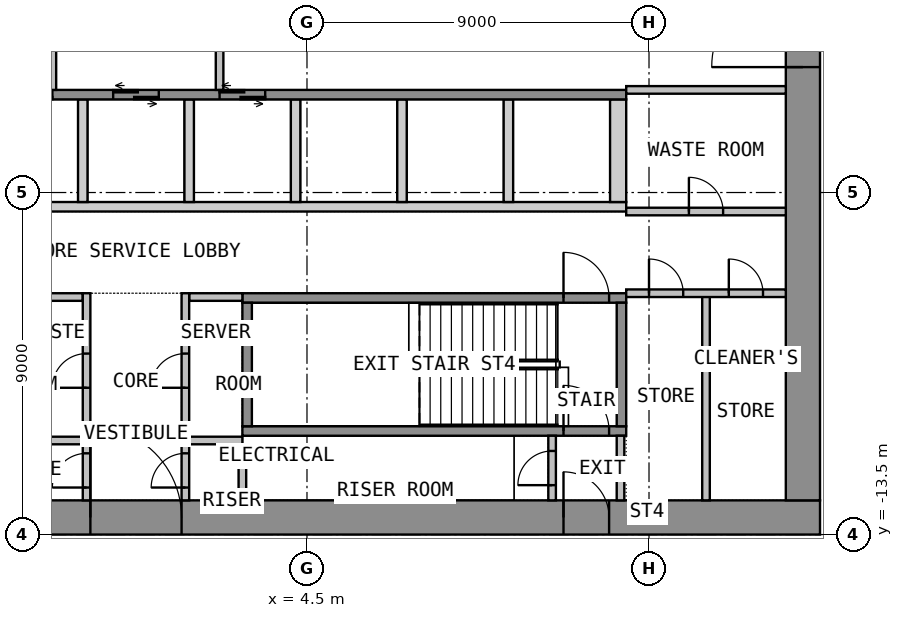
"""IFC4 building model, lengths in metres.
Left out: names, types, materials, properties, quantities, classifications, styles, units other than length and angle.
Written with IfcOpenShell. Run it as: python <this file> out.ifc"""

import sys

from ifc_helpers import new_model, si_unit, direction, frame, frame_2d, origin, place, context, subcontext, project, spatial, polyline, rectangle, outline, extrude, element, fill, save


model = new_model("IFC4")
c1 = context("Model", 3, precision=1e-05, world=origin(), true_north=direction((0.0, 1.0)))
c2 = subcontext(c1, "Body", "Model", "MODEL_VIEW")
j1 = project(units=[si_unit("LENGTHUNIT", "METRE"), si_unit("PLANEANGLEUNIT", "RADIAN")], contexts=[c1])
p1 = place(None, origin())
s1 = spatial("IfcSite", under=j1, at=p1, CompositionType="ELEMENT")
p2 = place(p1, origin())
s2 = spatial("IfcBuilding", under=s1, at=p2, CompositionType="ELEMENT")
p3 = place(p2, frame((0.0, 0.0, 15.6)))
s3 = spatial("IfcBuildingStorey", under=s2, at=p3, CompositionType="ELEMENT", Elevation=15.6)
p4 = place(p3, frame((-18.0, -13.05, 0.0), z_axis=(0.0, 0.0, 1.0), x_axis=(1.0, 0.0, 0.0)))
e1 = element("IfcWall", 1, at=p4, inside=s3, PredefinedType="SHEAR", context=c2, shape_type="SweptSolid", body=[
    extrude(rectangle(XDim=36.0, YDim=0.9, at=frame_2d((18.0, 0.0))), origin(), (0.0, 0.0, 1.0), 4.4),
])
p5 = place(p4, frame((16.8, 0.0, 0.0)))
e2 = element("IfcOpeningElement", 2, at=p5, cuts=e1, PredefinedType="OPENING", context=c2, shape_type="SweptSolid", body=[
    extrude(rectangle(XDim=2.4, YDim=2.1, at=frame_2d((1.2, 1.05))), frame((0.0, 0.46, 0.0), z_axis=(0.0, -1.0, 0.0), x_axis=(1.0, 0.0, 0.0)), (0.0, 0.0, 1.0), 0.92),
])
p6 = place(p4, frame((5.55, 0.0, 0.0)))
e3 = element("IfcOpeningElement", 3, at=p6, cuts=e1, PredefinedType="OPENING", context=c2, shape_type="SweptSolid", body=[
    extrude(rectangle(XDim=1.2, YDim=2.1, at=frame_2d((0.6, 1.05))), frame((0.0, 0.46, 0.0), z_axis=(0.0, -1.0, 0.0), x_axis=(1.0, 0.0, 0.0)), (0.0, 0.0, 1.0), 0.92),
])
p7 = place(p4, frame((29.25, 0.0, 0.0)))
e4 = element("IfcOpeningElement", 4, at=p7, cuts=e1, PredefinedType="OPENING", context=c2, shape_type="SweptSolid", body=[
    extrude(rectangle(XDim=1.2, YDim=2.1, at=frame_2d((0.6, 1.05))), frame((0.0, 0.46, 0.0), z_axis=(0.0, -1.0, 0.0), x_axis=(1.0, 0.0, 0.0)), (0.0, 0.0, 1.0), 0.92),
])
p8 = place(p3, frame((17.55, -12.6, 0.0), z_axis=(0.0, 0.0, 1.0), x_axis=(0.0, 1.0, 0.0)))
e5 = element("IfcWall", 5, at=p8, inside=s3, PredefinedType="SHEAR", context=c2, shape_type="SweptSolid", body=[
    extrude(rectangle(XDim=25.2, YDim=0.9, at=frame_2d((12.6, 0.0))), origin(), (0.0, 0.0, 1.0), 4.4),
])
p9 = place(p8, frame((11.4, 0.0, 0.0)))
e6 = element("IfcOpeningElement", 6, at=p9, cuts=e5, PredefinedType="OPENING", context=c2, shape_type="SweptSolid", body=[
    extrude(rectangle(XDim=2.4, YDim=2.1, at=frame_2d((1.2, 1.05))), frame((0.0, 0.46, 0.0), z_axis=(0.0, -1.0, 0.0), x_axis=(1.0, 0.0, 0.0)), (0.0, 0.0, 1.0), 0.92),
])
p10 = place(p3, origin())
e7 = element("IfcWall", 7, at=p10, inside=s3, PredefinedType="SHEAR", context=c2, shape_type="SweptSolid", body=[
    extrude(outline(polyline([(-12.9, -5.0), (12.9, -5.0), (12.9, -4.75), (-12.9, -4.75), (-12.9, -5.0)])), origin(), (0.0, 0.0, 1.0), 4.4),
])
p11 = place(p3, origin())
e8 = element("IfcWall", 8, at=p11, inside=s3, PredefinedType="SHEAR", context=c2, shape_type="SweptSolid", body=[
    extrude(outline(polyline([(-1.525, -4.75), (-1.275, -4.75), (-1.275, -2.05), (-1.525, -2.05), (-1.525, -4.75)])), origin(), (0.0, 0.0, 1.0), 4.4),
])
p12 = place(p3, origin())
e9 = element("IfcWall", 9, at=p12, inside=s3, PredefinedType="SHEAR", context=c2, shape_type="SweptSolid", body=[
    extrude(outline(polyline([(1.275, -4.75), (1.525, -4.75), (1.525, -2.05), (1.275, -2.05), (1.275, -4.75)])), origin(), (0.0, 0.0, 1.0), 4.4),
])
p13 = place(p3, origin())
e10 = element("IfcWall", 10, at=p13, inside=s3, PredefinedType="SHEAR", context=c2, shape_type="SweptSolid", body=[
    extrude(outline(polyline([(4.075, -4.75), (4.325, -4.75), (4.325, -2.05), (4.075, -2.05), (4.075, -4.75)])), origin(), (0.0, 0.0, 1.0), 4.4),
])
p14 = place(p3, origin())
e11 = element("IfcWall", 11, at=p14, inside=s3, PredefinedType="SHEAR", context=c2, shape_type="SweptSolid", body=[
    extrude(outline(polyline([(6.875, -4.75), (7.125, -4.75), (7.125, -2.05), (6.875, -2.05), (6.875, -4.75)])), origin(), (0.0, 0.0, 1.0), 4.4),
])
p15 = place(p3, origin())
e12 = element("IfcWall", 12, at=p15, inside=s3, PredefinedType="SHEAR", context=c2, shape_type="SweptSolid", body=[
    extrude(outline(polyline([(9.675, -4.75), (9.925, -4.75), (9.925, -2.05), (9.675, -2.05), (9.675, -4.75)])), origin(), (0.0, 0.0, 1.0), 4.4),
])
p16 = place(p3, origin())
e13 = element("IfcWall", 13, at=p16, inside=s3, PredefinedType="SHEAR", context=c2, shape_type="SweptSolid", body=[
    extrude(outline(polyline([(12.475, -4.75), (12.9, -4.75), (12.9, -2.05), (12.475, -2.05), (12.475, -4.75)])), origin(), (0.0, 0.0, 1.0), 4.4),
])
p17 = place(p3, frame((-12.9, -1.925, 0.0), z_axis=(0.0, 0.0, 1.0), x_axis=(1.0, 0.0, 0.0)))
e14 = element("IfcWall", 14, at=p17, inside=s3, PredefinedType="SHEAR", context=c2, shape_type="SweptSolid", body=[
    extrude(rectangle(XDim=25.8, YDim=0.25, at=frame_2d((12.9, 0.0))), origin(), (0.0, 0.0, 1.0), 4.4),
])
p18 = place(p17, frame((1.1, 0.0, 0.0)))
e15 = element("IfcOpeningElement", 15, at=p18, cuts=e14, PredefinedType="OPENING", context=c2, shape_type="SweptSolid", body=[
    extrude(rectangle(XDim=1.2, YDim=2.1, at=frame_2d((0.6, 1.05))), frame((0.0, 0.135, 0.0), z_axis=(0.0, -1.0, 0.0), x_axis=(1.0, 0.0, 0.0)), (0.0, 0.0, 1.0), 0.27),
])
p19 = place(p17, frame((3.9, 0.0, 0.0)))
e16 = element("IfcOpeningElement", 16, at=p19, cuts=e14, PredefinedType="OPENING", context=c2, shape_type="SweptSolid", body=[
    extrude(rectangle(XDim=1.2, YDim=2.1, at=frame_2d((0.6, 1.05))), frame((0.0, 0.135, 0.0), z_axis=(0.0, -1.0, 0.0), x_axis=(1.0, 0.0, 0.0)), (0.0, 0.0, 1.0), 0.27),
])
p20 = place(p17, frame((6.7, 0.0, 0.0)))
e17 = element("IfcOpeningElement", 17, at=p20, cuts=e14, PredefinedType="OPENING", context=c2, shape_type="SweptSolid", body=[
    extrude(rectangle(XDim=1.2, YDim=2.1, at=frame_2d((0.6, 1.05))), frame((0.0, 0.135, 0.0), z_axis=(0.0, -1.0, 0.0), x_axis=(1.0, 0.0, 0.0)), (0.0, 0.0, 1.0), 0.27),
])
p21 = place(p17, frame((9.5, 0.0, 0.0)))
e18 = element("IfcOpeningElement", 18, at=p21, cuts=e14, PredefinedType="OPENING", context=c2, shape_type="SweptSolid", body=[
    extrude(rectangle(XDim=1.2, YDim=2.1, at=frame_2d((0.6, 1.05))), frame((0.0, 0.135, 0.0), z_axis=(0.0, -1.0, 0.0), x_axis=(1.0, 0.0, 0.0)), (0.0, 0.0, 1.0), 0.27),
])
p22 = place(p17, frame((12.3, 0.0, 0.0)))
e19 = element("IfcOpeningElement", 19, at=p22, cuts=e14, PredefinedType="OPENING", context=c2, shape_type="SweptSolid", body=[
    extrude(rectangle(XDim=1.2, YDim=2.1, at=frame_2d((0.6, 1.05))), frame((0.0, 0.135, 0.0), z_axis=(0.0, -1.0, 0.0), x_axis=(1.0, 0.0, 0.0)), (0.0, 0.0, 1.0), 0.27),
])
p23 = place(p17, frame((15.1, 0.0, 0.0)))
e20 = element("IfcOpeningElement", 20, at=p23, cuts=e14, PredefinedType="OPENING", context=c2, shape_type="SweptSolid", body=[
    extrude(rectangle(XDim=1.2, YDim=2.1, at=frame_2d((0.6, 1.05))), frame((0.0, 0.135, 0.0), z_axis=(0.0, -1.0, 0.0), x_axis=(1.0, 0.0, 0.0)), (0.0, 0.0, 1.0), 0.27),
])
p24 = place(p3, frame((-2.2, -1.8, 0.0), z_axis=(0.0, 0.0, 1.0), x_axis=(0.0, 1.0, 0.0)))
e21 = element("IfcWall", 21, at=p24, inside=s3, PredefinedType="PARTITIONING", context=c2, shape_type="SweptSolid", body=[
    extrude(rectangle(XDim=3.6, YDim=0.2, at=frame_2d((1.8, 0.0))), origin(), (0.0, 0.0, 1.0), 4.4),
])
p25 = place(p24, frame((1.2, 0.0, 0.0)))
e22 = element("IfcOpeningElement", 22, at=p25, cuts=e21, PredefinedType="OPENING", context=c2, shape_type="SweptSolid", body=[
    extrude(rectangle(XDim=1.2, YDim=2.1, at=frame_2d((0.6, 1.05))), frame((0.0, 0.11, 0.0), z_axis=(0.0, -1.0, 0.0), x_axis=(1.0, 0.0, 0.0)), (0.0, 0.0, 1.0), 0.22),
])
p26 = place(p3, frame((2.2, -1.8, 0.0), z_axis=(0.0, 0.0, 1.0), x_axis=(0.0, 1.0, 0.0)))
e23 = element("IfcWall", 23, at=p26, inside=s3, PredefinedType="PARTITIONING", context=c2, shape_type="SweptSolid", body=[
    extrude(rectangle(XDim=3.6, YDim=0.2, at=frame_2d((1.8, 0.0))), origin(), (0.0, 0.0, 1.0), 4.4),
])
p27 = place(p26, frame((1.2, 0.0, 0.0)))
e24 = element("IfcOpeningElement", 24, at=p27, cuts=e23, PredefinedType="OPENING", context=c2, shape_type="SweptSolid", body=[
    extrude(rectangle(XDim=1.2, YDim=2.1, at=frame_2d((0.6, 1.05))), frame((0.0, 0.11, 0.0), z_axis=(0.0, -1.0, 0.0), x_axis=(1.0, 0.0, 0.0)), (0.0, 0.0, 1.0), 0.22),
])
p28 = place(p3, frame((2.8, -10.775, 0.0), z_axis=(0.0, 0.0, 1.0), x_axis=(1.0, 0.0, 0.0)))
e25 = element("IfcWall", 25, at=p28, inside=s3, PredefinedType="SHEAR", context=c2, shape_type="SweptSolid", body=[
    extrude(rectangle(XDim=10.1, YDim=0.25, at=frame_2d((5.05, 0.0))), origin(), (0.0, 0.0, 1.0), 4.4),
])
p29 = place(p28, frame((8.45, 0.0, 0.0)))
e26 = element("IfcOpeningElement", 26, at=p29, cuts=e25, PredefinedType="OPENING", context=c2, shape_type="SweptSolid", body=[
    extrude(rectangle(XDim=1.2, YDim=2.1, at=frame_2d((0.6, 1.05))), frame((0.0, 0.135, 0.0), z_axis=(0.0, -1.0, 0.0), x_axis=(1.0, 0.0, 0.0)), (0.0, 0.0, 1.0), 0.27),
])
p30 = place(p3, frame((2.8, -7.275, 0.0), z_axis=(0.0, 0.0, 1.0), x_axis=(1.0, 0.0, 0.0)))
e27 = element("IfcWall", 27, at=p30, inside=s3, PredefinedType="SHEAR", context=c2, shape_type="SweptSolid", body=[
    extrude(rectangle(XDim=10.1, YDim=0.25, at=frame_2d((5.05, 0.0))), origin(), (0.0, 0.0, 1.0), 4.4),
])
p31 = place(p30, frame((8.45, 0.0, 0.0)))
e28 = element("IfcOpeningElement", 28, at=p31, cuts=e27, PredefinedType="OPENING", context=c2, shape_type="SweptSolid", body=[
    extrude(rectangle(XDim=1.2, YDim=2.1, at=frame_2d((0.6, 1.05))), frame((0.0, 0.135, 0.0), z_axis=(0.0, -1.0, 0.0), x_axis=(1.0, 0.0, 0.0)), (0.0, 0.0, 1.0), 0.27),
])
for number, where, z_axis, x_axis in (
    (29, (2.925, -10.65, 0.0), (0.0, 0.0, 1.0), (0.0, 1.0, 0.0)),
    (30, (12.775, -10.65, 0.0), (0.0, 0.0, 1.0), (0.0, 1.0, 0.0)),
):
    element("IfcWall", number, at=place(p3, frame(where, z_axis=z_axis, x_axis=x_axis)), inside=s3, PredefinedType="SHEAR", context=c2, shape_type="SweptSolid", body=[
        extrude(rectangle(XDim=3.25, YDim=0.25, at=frame_2d((1.625, 0.0))), origin(), (0.0, 0.0, 1.0), 4.4),
    ])
for number, where, z_axis, x_axis in (
    (31, (-2.8, -7.25, 0.0), (0.0, 0.0, 1.0), (1.0, 0.0, 0.0)),
    (32, (-2.8, -11.025, 0.0), (0.0, 0.0, 1.0), (1.0, 0.0, 0.0)),
    (33, (1.4, -7.25, 0.0), (0.0, 0.0, 1.0), (1.0, 0.0, 0.0)),
    (34, (1.4, -11.025, 0.0), (0.0, 0.0, 1.0), (1.0, 0.0, 0.0)),
):
    element("IfcWall", number, at=place(p3, frame(where, z_axis=z_axis, x_axis=x_axis)), inside=s3, PredefinedType="PARTITIONING", context=c2, shape_type="SweptSolid", body=[
        extrude(rectangle(XDim=1.4, YDim=0.2, at=frame_2d((0.7, 0.0))), origin(), (0.0, 0.0, 1.0), 4.4),
    ])
p32 = place(p3, frame((-1.3, -12.6, 0.0), z_axis=(0.0, 0.0, 1.0), x_axis=(0.0, 1.0, 0.0)))
e35 = element("IfcWall", 35, at=p32, inside=s3, PredefinedType="PARTITIONING", context=c2, shape_type="SweptSolid", body=[
    extrude(rectangle(XDim=5.45, YDim=0.2, at=frame_2d((2.725, 0.0))), origin(), (0.0, 0.0, 1.0), 4.4),
])
p33 = place(p32, frame((0.337, 0.0, 0.0)))
e36 = element("IfcOpeningElement", 36, at=p33, cuts=e35, PredefinedType="OPENING", context=c2, shape_type="SweptSolid", body=[
    extrude(rectangle(XDim=0.9, YDim=2.1, at=frame_2d((0.45, 1.05))), frame((0.0, 0.11, 0.0), z_axis=(0.0, -1.0, 0.0), x_axis=(1.0, 0.0, 0.0)), (0.0, 0.0, 1.0), 0.22),
])
p34 = place(p32, frame((2.962, 0.0, 0.0)))
e37 = element("IfcOpeningElement", 37, at=p34, cuts=e35, PredefinedType="OPENING", context=c2, shape_type="SweptSolid", body=[
    extrude(rectangle(XDim=0.9, YDim=2.1, at=frame_2d((0.45, 1.05))), frame((0.0, 0.11, 0.0), z_axis=(0.0, -1.0, 0.0), x_axis=(1.0, 0.0, 0.0)), (0.0, 0.0, 1.0), 0.22),
])
p35 = place(p3, frame((1.3, -12.6, 0.0), z_axis=(0.0, 0.0, 1.0), x_axis=(0.0, 1.0, 0.0)))
e38 = element("IfcWall", 38, at=p35, inside=s3, PredefinedType="PARTITIONING", context=c2, shape_type="SweptSolid", body=[
    extrude(rectangle(XDim=5.45, YDim=0.2, at=frame_2d((2.725, 0.0))), origin(), (0.0, 0.0, 1.0), 4.4),
])
p36 = place(p35, frame((0.337, 0.0, 0.0)))
e39 = element("IfcOpeningElement", 39, at=p36, cuts=e38, PredefinedType="OPENING", context=c2, shape_type="SweptSolid", body=[
    extrude(rectangle(XDim=0.9, YDim=2.1, at=frame_2d((0.45, 1.05))), frame((0.0, 0.11, 0.0), z_axis=(0.0, -1.0, 0.0), x_axis=(1.0, 0.0, 0.0)), (0.0, 0.0, 1.0), 0.22),
])
p37 = place(p35, frame((2.962, 0.0, 0.0)))
e40 = element("IfcOpeningElement", 40, at=p37, cuts=e38, PredefinedType="OPENING", context=c2, shape_type="SweptSolid", body=[
    extrude(rectangle(XDim=0.9, YDim=2.1, at=frame_2d((0.45, 1.05))), frame((0.0, 0.11, 0.0), z_axis=(0.0, -1.0, 0.0), x_axis=(1.0, 0.0, 0.0)), (0.0, 0.0, 1.0), 0.22),
])
p38 = place(p3, frame((12.75, -12.6, 0.0), z_axis=(0.0, 0.0, 1.0), x_axis=(0.0, 1.0, 0.0)))
e41 = element("IfcWall", 41, at=p38, inside=s3, PredefinedType="PARTITIONING", context=c2, shape_type="SweptSolid", body=[
    extrude(rectangle(XDim=1.7, YDim=0.2, at=frame_2d((0.85, 0.0))), origin(), (0.0, 0.0, 1.0), 4.4),
])
p39 = place(p3, frame((10.95, -12.6, 0.0), z_axis=(0.0, 0.0, 1.0), x_axis=(0.0, 1.0, 0.0)))
e42 = element("IfcWall", 42, at=p39, inside=s3, PredefinedType="PARTITIONING", context=c2, shape_type="SweptSolid", body=[
    extrude(rectangle(XDim=1.7, YDim=0.2, at=frame_2d((0.85, 0.0))), origin(), (0.0, 0.0, 1.0), 4.4),
])
p40 = place(p39, frame((0.4, 0.0, 0.0)))
e43 = element("IfcOpeningElement", 43, at=p40, cuts=e42, PredefinedType="OPENING", context=c2, shape_type="SweptSolid", body=[
    extrude(rectangle(XDim=0.9, YDim=2.1, at=frame_2d((0.45, 1.05))), frame((0.0, 0.11, 0.0), z_axis=(0.0, -1.0, 0.0), x_axis=(1.0, 0.0, 0.0)), (0.0, 0.0, 1.0), 0.22),
])
p41 = place(p3, frame((15.0, -12.6, 0.0), z_axis=(0.0, 0.0, 1.0), x_axis=(0.0, 1.0, 0.0)))
e44 = element("IfcWall", 44, at=p41, inside=s3, PredefinedType="PARTITIONING", context=c2, shape_type="SweptSolid", body=[
    extrude(rectangle(XDim=5.45, YDim=0.2, at=frame_2d((2.725, 0.0))), origin(), (0.0, 0.0, 1.0), 4.4),
])
p42 = place(p3, frame((12.9, -7.15, 0.0), z_axis=(0.0, 0.0, 1.0), x_axis=(1.0, 0.0, 0.0)))
e45 = element("IfcWall", 45, at=p42, inside=s3, PredefinedType="PARTITIONING", context=c2, shape_type="SweptSolid", body=[
    extrude(rectangle(XDim=4.2, YDim=0.2, at=frame_2d((2.1, 0.0))), origin(), (0.0, 0.0, 1.0), 4.4),
])
p43 = place(p42, frame((0.6, 0.0, 0.0)))
e46 = element("IfcOpeningElement", 46, at=p43, cuts=e45, PredefinedType="OPENING", context=c2, shape_type="SweptSolid", body=[
    extrude(rectangle(XDim=0.9, YDim=2.1, at=frame_2d((0.45, 1.05))), frame((0.0, 0.11, 0.0), z_axis=(0.0, -1.0, 0.0), x_axis=(1.0, 0.0, 0.0)), (0.0, 0.0, 1.0), 0.22),
])
p44 = place(p42, frame((2.7, 0.0, 0.0)))
e47 = element("IfcOpeningElement", 47, at=p44, cuts=e45, PredefinedType="OPENING", context=c2, shape_type="SweptSolid", body=[
    extrude(rectangle(XDim=0.9, YDim=2.1, at=frame_2d((0.45, 1.05))), frame((0.0, 0.11, 0.0), z_axis=(0.0, -1.0, 0.0), x_axis=(1.0, 0.0, 0.0)), (0.0, 0.0, 1.0), 0.22),
])
p45 = place(p3, frame((12.9, -5.0, 0.0), z_axis=(0.0, 0.0, 1.0), x_axis=(1.0, 0.0, 0.0)))
e48 = element("IfcWall", 48, at=p45, inside=s3, PredefinedType="PARTITIONING", context=c2, shape_type="SweptSolid", body=[
    extrude(rectangle(XDim=4.2, YDim=0.2, at=frame_2d((2.1, 0.0))), origin(), (0.0, 0.0, 1.0), 4.4),
])
p46 = place(p45, frame((1.65, 0.0, 0.0)))
e49 = element("IfcOpeningElement", 49, at=p46, cuts=e48, PredefinedType="OPENING", context=c2, shape_type="SweptSolid", body=[
    extrude(rectangle(XDim=0.9, YDim=2.1, at=frame_2d((0.45, 1.05))), frame((0.0, 0.11, 0.0), z_axis=(0.0, -1.0, 0.0), x_axis=(1.0, 0.0, 0.0)), (0.0, 0.0, 1.0), 0.22),
])
p47 = place(p3, frame((12.9, -1.8, 0.0), z_axis=(0.0, 0.0, 1.0), x_axis=(1.0, 0.0, 0.0)))
e50 = element("IfcWall", 50, at=p47, inside=s3, PredefinedType="PARTITIONING", context=c2, shape_type="SweptSolid", body=[
    extrude(rectangle(XDim=4.2, YDim=0.2, at=frame_2d((2.1, 0.0))), origin(), (0.0, 0.0, 1.0), 4.4),
])
p48 = place(p3, frame((2.8, -12.599, 0.0), z_axis=(0.0, 0.0, 1.0), x_axis=(0.0, 1.0, 0.0)))
e51 = element("IfcWall", 51, at=p48, inside=s3, PredefinedType="PARTITIONING", context=c2, shape_type="SweptSolid", body=[
    extrude(rectangle(XDim=1.473, YDim=0.2, at=frame_2d((0.737, 0.0))), origin(), (0.0, 0.0, 1.0), 4.4),
])
p49 = place(p9, origin())
e52 = element("IfcDoor", 52, at=p49, inside=s3, OperationType="DOUBLE_DOOR_DOUBLE_SWING", PredefinedType="DOOR", context=c2, shape_type="SweptSolid", body=[
    extrude(rectangle(XDim=2.4, YDim=2.1, at=frame_2d((1.2, 1.05))), frame((0.0, 0.025, 0.0), z_axis=(0.0, -1.0, 0.0), x_axis=(1.0, 0.0, 0.0)), (0.0, 0.0, 1.0), 0.05),
])
fill(e6, e52)
p50 = place(p5, origin())
e53 = element("IfcDoor", 53, at=p50, inside=s3, OperationType="DOUBLE_DOOR_DOUBLE_SWING", PredefinedType="DOOR", context=c2, shape_type="SweptSolid", body=[
    extrude(rectangle(XDim=2.4, YDim=2.1, at=frame_2d((1.2, 1.05))), frame((0.0, 0.025, 0.0), z_axis=(0.0, -1.0, 0.0), x_axis=(1.0, 0.0, 0.0)), (0.0, 0.0, 1.0), 0.05),
])
fill(e2, e53)
p51 = place(p7, origin())
e54 = element("IfcDoor", 54, at=p51, inside=s3, OperationType="SINGLE_SWING_RIGHT", PredefinedType="DOOR", context=c2, shape_type="SweptSolid", body=[
    extrude(rectangle(XDim=1.2, YDim=2.1, at=frame_2d((0.6, 1.05))), frame((0.0, 0.025, 0.0), z_axis=(0.0, -1.0, 0.0), x_axis=(1.0, 0.0, 0.0)), (0.0, 0.0, 1.0), 0.05),
])
fill(e4, e54)
p52 = place(p21, origin())
e55 = element("IfcDoor", 55, at=p52, inside=s3, OperationType="DOUBLE_DOOR_SLIDING", PredefinedType="DOOR", context=c2, shape_type="SweptSolid", body=[
    extrude(rectangle(XDim=1.2, YDim=2.1, at=frame_2d((0.6, 1.05))), frame((0.0, 0.025, 0.0), z_axis=(0.0, -1.0, 0.0), x_axis=(1.0, 0.0, 0.0)), (0.0, 0.0, 1.0), 0.05),
])
fill(e18, e55)
p53 = place(p22, origin())
e56 = element("IfcDoor", 56, at=p53, inside=s3, OperationType="DOUBLE_DOOR_SLIDING", PredefinedType="DOOR", context=c2, shape_type="SweptSolid", body=[
    extrude(rectangle(XDim=1.2, YDim=2.1, at=frame_2d((0.6, 1.05))), frame((0.0, 0.025, 0.0), z_axis=(0.0, -1.0, 0.0), x_axis=(1.0, 0.0, 0.0)), (0.0, 0.0, 1.0), 0.05),
])
fill(e19, e56)
p54 = place(p23, origin())
e57 = element("IfcDoor", 57, at=p54, inside=s3, OperationType="DOUBLE_DOOR_SLIDING", PredefinedType="DOOR", context=c2, shape_type="SweptSolid", body=[
    extrude(rectangle(XDim=1.2, YDim=2.1, at=frame_2d((0.6, 1.05))), frame((0.0, 0.025, 0.0), z_axis=(0.0, -1.0, 0.0), x_axis=(1.0, 0.0, 0.0)), (0.0, 0.0, 1.0), 0.05),
])
fill(e20, e57)
p55 = place(p31, origin())
e58 = element("IfcDoor", 58, at=p55, inside=s3, OperationType="SINGLE_SWING_LEFT", PredefinedType="DOOR", context=c2, shape_type="SweptSolid", body=[
    extrude(rectangle(XDim=1.2, YDim=2.1, at=frame_2d((0.6, 1.05))), frame((0.0, 0.025, 0.0), z_axis=(0.0, -1.0, 0.0), x_axis=(1.0, 0.0, 0.0)), (0.0, 0.0, 1.0), 0.05),
])
fill(e28, e58)
p56 = place(p33, origin())
e59 = element("IfcDoor", 59, at=p56, inside=s3, OperationType="SINGLE_SWING_LEFT", PredefinedType="DOOR", context=c2, shape_type="SweptSolid", body=[
    extrude(rectangle(XDim=0.9, YDim=2.1, at=frame_2d((0.45, 1.05))), frame((0.0, 0.025, 0.0), z_axis=(0.0, -1.0, 0.0), x_axis=(1.0, 0.0, 0.0)), (0.0, 0.0, 1.0), 0.05),
])
fill(e36, e59)
p57 = place(p34, origin())
e60 = element("IfcDoor", 60, at=p57, inside=s3, OperationType="SINGLE_SWING_LEFT", PredefinedType="DOOR", context=c2, shape_type="SweptSolid", body=[
    extrude(rectangle(XDim=0.9, YDim=2.1, at=frame_2d((0.45, 1.05))), frame((0.0, 0.025, 0.0), z_axis=(0.0, -1.0, 0.0), x_axis=(1.0, 0.0, 0.0)), (0.0, 0.0, 1.0), 0.05),
])
fill(e37, e60)
p58 = place(p36, origin())
e61 = element("IfcDoor", 61, at=p58, inside=s3, OperationType="SINGLE_SWING_LEFT", PredefinedType="DOOR", context=c2, shape_type="SweptSolid", body=[
    extrude(rectangle(XDim=0.9, YDim=2.1, at=frame_2d((0.45, 1.05))), frame((0.0, 0.025, 0.0), z_axis=(0.0, -1.0, 0.0), x_axis=(1.0, 0.0, 0.0)), (0.0, 0.0, 1.0), 0.05),
])
fill(e39, e61)
p59 = place(p37, origin())
e62 = element("IfcDoor", 62, at=p59, inside=s3, OperationType="SINGLE_SWING_LEFT", PredefinedType="DOOR", context=c2, shape_type="SweptSolid", body=[
    extrude(rectangle(XDim=0.9, YDim=2.1, at=frame_2d((0.45, 1.05))), frame((0.0, 0.025, 0.0), z_axis=(0.0, -1.0, 0.0), x_axis=(1.0, 0.0, 0.0)), (0.0, 0.0, 1.0), 0.05),
])
fill(e40, e62)
p60 = place(p29, origin())
e63 = element("IfcDoor", 63, at=p60, inside=s3, OperationType="SINGLE_SWING_RIGHT", PredefinedType="DOOR", context=c2, shape_type="SweptSolid", body=[
    extrude(rectangle(XDim=1.2, YDim=2.1, at=frame_2d((0.6, 1.05))), frame((0.0, 0.025, 0.0), z_axis=(0.0, -1.0, 0.0), x_axis=(1.0, 0.0, 0.0)), (0.0, 0.0, 1.0), 0.05),
])
fill(e26, e63)
p61 = place(p40, origin())
e64 = element("IfcDoor", 64, at=p61, inside=s3, OperationType="SINGLE_SWING_LEFT", PredefinedType="DOOR", context=c2, shape_type="SweptSolid", body=[
    extrude(rectangle(XDim=0.9, YDim=2.1, at=frame_2d((0.45, 1.05))), frame((0.0, 0.025, 0.0), z_axis=(0.0, -1.0, 0.0), x_axis=(1.0, 0.0, 0.0)), (0.0, 0.0, 1.0), 0.05),
])
fill(e43, e64)
p62 = place(p43, origin())
e65 = element("IfcDoor", 65, at=p62, inside=s3, OperationType="SINGLE_SWING_LEFT", PredefinedType="DOOR", context=c2, shape_type="SweptSolid", body=[
    extrude(rectangle(XDim=0.9, YDim=2.1, at=frame_2d((0.45, 1.05))), frame((0.0, 0.025, 0.0), z_axis=(0.0, -1.0, 0.0), x_axis=(1.0, 0.0, 0.0)), (0.0, 0.0, 1.0), 0.05),
])
fill(e46, e65)
p63 = place(p44, origin())
e66 = element("IfcDoor", 66, at=p63, inside=s3, OperationType="SINGLE_SWING_LEFT", PredefinedType="DOOR", context=c2, shape_type="SweptSolid", body=[
    extrude(rectangle(XDim=0.9, YDim=2.1, at=frame_2d((0.45, 1.05))), frame((0.0, 0.025, 0.0), z_axis=(0.0, -1.0, 0.0), x_axis=(1.0, 0.0, 0.0)), (0.0, 0.0, 1.0), 0.05),
])
fill(e47, e66)
p64 = place(p46, origin())
e67 = element("IfcDoor", 67, at=p64, inside=s3, OperationType="SINGLE_SWING_LEFT", PredefinedType="DOOR", context=c2, shape_type="SweptSolid", body=[
    extrude(rectangle(XDim=0.9, YDim=2.1, at=frame_2d((0.45, 1.05))), frame((0.0, 0.025, 0.0), z_axis=(0.0, -1.0, 0.0), x_axis=(1.0, 0.0, 0.0)), (0.0, 0.0, 1.0), 0.05),
])
fill(e49, e67)
save(model, sys.argv[1])
